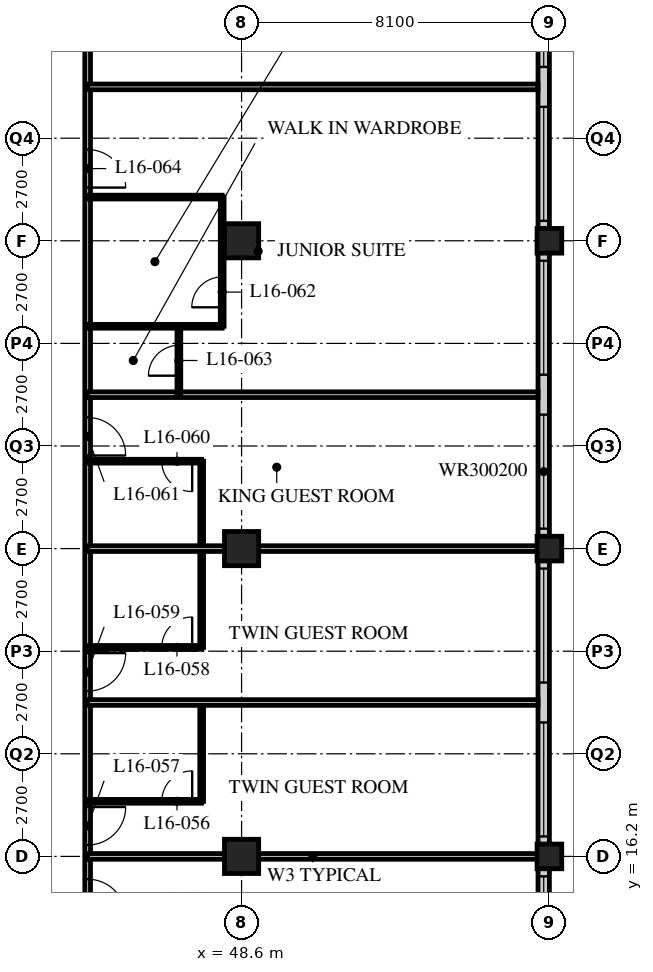
"""IFC4 building model, lengths in metres.
Left out: names, types, materials, properties, quantities, classifications, styles, units other than length and angle.
Written with IfcOpenShell. Run it as: python <this file> out.ifc"""

import sys

from ifc_helpers import new_model, si_unit, direction, frame, frame_2d, origin, origin_2d, place, context, subcontext, project, spatial, rectangle, hollow_rectangle, extrude, element, fill, save


model = new_model("IFC4")
c1 = context("Model", 3, precision=1e-05, world=origin(), true_north=direction((0.0, 1.0)))
c2 = subcontext(c1, "Body", "Model", "MODEL_VIEW")
j1 = project(units=[si_unit("LENGTHUNIT", "METRE"), si_unit("PLANEANGLEUNIT", "RADIAN")], contexts=[c1])
p1 = place(None, origin())
s1 = spatial("IfcSite", under=j1, at=p1, CompositionType="ELEMENT")
p2 = place(p1, origin())
s2 = spatial("IfcBuilding", under=s1, at=p2, CompositionType="ELEMENT")
p3 = place(p2, frame((0.0, 0.0, 67.0)))
s3 = spatial("IfcBuildingStorey", under=s2, at=p3, CompositionType="ELEMENT", Elevation=67.0)
for number, where, z_axis, x_axis in (
    (1, (48.6, 16.2, 0.0), (0.0, 0.0, 1.0), (1.0, 0.0, 0.0)),
    (2, (48.6, 24.3, 0.0), (0.0, 0.0, 1.0), (1.0, 0.0, 0.0)),
    (3, (48.6, 32.4, 0.0), (0.0, 0.0, 1.0), (1.0, 0.0, 0.0)),
):
    element("IfcColumn", number, at=place(p3, frame(where, z_axis=z_axis, x_axis=x_axis)), inside=s3, PredefinedType="COLUMN", context=c2, shape_type="SweptSolid", body=[
        extrude(hollow_rectangle(XDim=0.9, YDim=0.9, WallThickness=0.09, at=origin_2d()), origin(), (0.0, 0.0, 1.0), 3.4),
    ])
for number, where, z_axis, x_axis in (
    (4, (56.7, 16.2, 0.0), (0.0, 0.0, 1.0), (1.0, 0.0, 0.0)),
    (5, (56.7, 24.3, 0.0), (0.0, 0.0, 1.0), (1.0, 0.0, 0.0)),
    (6, (56.7, 32.4, 0.0), (0.0, 0.0, 1.0), (1.0, 0.0, 0.0)),
):
    element("IfcColumn", number, at=place(p3, frame(where, z_axis=z_axis, x_axis=x_axis)), inside=s3, PredefinedType="COLUMN", context=c2, shape_type="SweptSolid", body=[
        extrude(hollow_rectangle(XDim=0.65, YDim=0.65, WallThickness=0.05, at=origin_2d()), origin(), (0.0, 0.0, 1.0), 3.4),
    ])
p4 = place(p3, frame((56.55, 8.4, 0.0), z_axis=(0.0, 0.0, 1.0), x_axis=(0.0, 1.0, 0.0)))
e7 = element("IfcWall", 7, at=p4, inside=s3, PredefinedType="SOLIDWALL", context=c2, shape_type="SweptSolid", body=[
    extrude(rectangle(XDim=32.1, YDim=0.3, at=frame_2d((16.05, 0.0))), origin(), (0.0, 0.0, 1.0), 3.19),
])
p5 = place(p4, frame((0.225, 0.0, 0.9)))
e8 = element("IfcOpeningElement", 8, at=p5, cuts=e7, PredefinedType="OPENING", context=c2, shape_type="SweptSolid", body=[
    extrude(rectangle(XDim=3.0, YDim=2.0, at=frame_2d((1.5, 1.0))), frame((0.0, 0.16, 0.0), z_axis=(0.0, -1.0, 0.0), x_axis=(1.0, 0.0, 0.0)), (0.0, 0.0, 1.0), 0.32),
])
p6 = place(p4, frame((4.275, 0.0, 0.9)))
e9 = element("IfcOpeningElement", 9, at=p6, cuts=e7, PredefinedType="OPENING", context=c2, shape_type="SweptSolid", body=[
    extrude(rectangle(XDim=3.0, YDim=2.0, at=frame_2d((1.5, 1.0))), frame((0.0, 0.16, 0.0), z_axis=(0.0, -1.0, 0.0), x_axis=(1.0, 0.0, 0.0)), (0.0, 0.0, 1.0), 0.32),
])
p7 = place(p4, frame((8.325, 0.0, 0.9)))
e10 = element("IfcOpeningElement", 10, at=p7, cuts=e7, PredefinedType="OPENING", context=c2, shape_type="SweptSolid", body=[
    extrude(rectangle(XDim=3.0, YDim=2.0, at=frame_2d((1.5, 1.0))), frame((0.0, 0.16, 0.0), z_axis=(0.0, -1.0, 0.0), x_axis=(1.0, 0.0, 0.0)), (0.0, 0.0, 1.0), 0.32),
])
p8 = place(p4, frame((12.375, 0.0, 0.9)))
e11 = element("IfcOpeningElement", 11, at=p8, cuts=e7, PredefinedType="OPENING", context=c2, shape_type="SweptSolid", body=[
    extrude(rectangle(XDim=3.0, YDim=2.0, at=frame_2d((1.5, 1.0))), frame((0.0, 0.16, 0.0), z_axis=(0.0, -1.0, 0.0), x_axis=(1.0, 0.0, 0.0)), (0.0, 0.0, 1.0), 0.32),
])
p9 = place(p4, frame((16.425, 0.0, 0.9)))
e12 = element("IfcOpeningElement", 12, at=p9, cuts=e7, PredefinedType="OPENING", context=c2, shape_type="SweptSolid", body=[
    extrude(rectangle(XDim=3.0, YDim=2.0, at=frame_2d((1.5, 1.0))), frame((0.0, 0.16, 0.0), z_axis=(0.0, -1.0, 0.0), x_axis=(1.0, 0.0, 0.0)), (0.0, 0.0, 1.0), 0.32),
])
p10 = place(p4, frame((20.475, 0.0, 0.9)))
e13 = element("IfcOpeningElement", 13, at=p10, cuts=e7, PredefinedType="OPENING", context=c2, shape_type="SweptSolid", body=[
    extrude(rectangle(XDim=3.0, YDim=2.0, at=frame_2d((1.5, 1.0))), frame((0.0, 0.16, 0.0), z_axis=(0.0, -1.0, 0.0), x_axis=(1.0, 0.0, 0.0)), (0.0, 0.0, 1.0), 0.32),
])
p11 = place(p4, frame((24.525, 0.0, 0.9)))
e14 = element("IfcOpeningElement", 14, at=p11, cuts=e7, PredefinedType="OPENING", context=c2, shape_type="SweptSolid", body=[
    extrude(rectangle(XDim=3.0, YDim=2.0, at=frame_2d((1.5, 1.0))), frame((0.0, 0.16, 0.0), z_axis=(0.0, -1.0, 0.0), x_axis=(1.0, 0.0, 0.0)), (0.0, 0.0, 1.0), 0.32),
])
p12 = place(p4, frame((28.575, 0.0, 0.9)))
e15 = element("IfcOpeningElement", 15, at=p12, cuts=e7, PredefinedType="OPENING", context=c2, shape_type="SweptSolid", body=[
    extrude(rectangle(XDim=3.0, YDim=2.0, at=frame_2d((1.5, 1.0))), frame((0.0, 0.16, 0.0), z_axis=(0.0, -1.0, 0.0), x_axis=(1.0, 0.0, 0.0)), (0.0, 0.0, 1.0), 0.32),
])
p13 = place(p3, frame((44.55, 12.15, 0.0), z_axis=(0.0, 0.0, 1.0), x_axis=(0.0, 1.0, 0.0)))
e16 = element("IfcWall", 16, at=p13, inside=s3, PredefinedType="PARTITIONING", context=c2, shape_type="SweptSolid", body=[
    extrude(rectangle(XDim=30.15, YDim=0.15, at=frame_2d((15.075, 0.0))), origin(), (0.0, 0.0, 1.0), 3.19),
])
p14 = place(p13, frame((2.45, 0.0, 0.0)))
e17 = element("IfcOpeningElement", 17, at=p14, cuts=e16, PredefinedType="OPENING", context=c2, shape_type="SweptSolid", body=[
    extrude(rectangle(XDim=1.0, YDim=2.1, at=frame_2d((0.5, 1.05))), frame((0.0, 0.085, 0.0), z_axis=(0.0, -1.0, 0.0), x_axis=(1.0, 0.0, 0.0)), (0.0, 0.0, 1.0), 0.17),
])
p15 = place(p13, frame((4.35, 0.0, 0.0)))
e18 = element("IfcOpeningElement", 18, at=p15, cuts=e16, PredefinedType="OPENING", context=c2, shape_type="SweptSolid", body=[
    extrude(rectangle(XDim=1.0, YDim=2.1, at=frame_2d((0.5, 1.05))), frame((0.0, 0.085, 0.0), z_axis=(0.0, -1.0, 0.0), x_axis=(1.0, 0.0, 0.0)), (0.0, 0.0, 1.0), 0.17),
])
p16 = place(p13, frame((8.4, 0.0, 0.0)))
e19 = element("IfcOpeningElement", 19, at=p16, cuts=e16, PredefinedType="OPENING", context=c2, shape_type="SweptSolid", body=[
    extrude(rectangle(XDim=1.0, YDim=2.1, at=frame_2d((0.5, 1.05))), frame((0.0, 0.085, 0.0), z_axis=(0.0, -1.0, 0.0), x_axis=(1.0, 0.0, 0.0)), (0.0, 0.0, 1.0), 0.17),
])
p17 = place(p13, frame((14.6, 0.0, 0.0)))
e20 = element("IfcOpeningElement", 20, at=p17, cuts=e16, PredefinedType="OPENING", context=c2, shape_type="SweptSolid", body=[
    extrude(rectangle(XDim=1.0, YDim=2.1, at=frame_2d((0.5, 1.05))), frame((0.0, 0.085, 0.0), z_axis=(0.0, -1.0, 0.0), x_axis=(1.0, 0.0, 0.0)), (0.0, 0.0, 1.0), 0.17),
])
p18 = place(p13, frame((21.65, 0.0, 0.0)))
e21 = element("IfcOpeningElement", 21, at=p18, cuts=e16, PredefinedType="OPENING", context=c2, shape_type="SweptSolid", body=[
    extrude(rectangle(XDim=1.0, YDim=2.1, at=frame_2d((0.5, 1.05))), frame((0.0, 0.085, 0.0), z_axis=(0.0, -1.0, 0.0), x_axis=(1.0, 0.0, 0.0)), (0.0, 0.0, 1.0), 0.17),
])
p19 = place(p13, frame((26.7, 0.0, 0.0)))
e22 = element("IfcOpeningElement", 22, at=p19, cuts=e16, PredefinedType="OPENING", context=c2, shape_type="SweptSolid", body=[
    extrude(rectangle(XDim=1.0, YDim=2.1, at=frame_2d((0.5, 1.05))), frame((0.0, 0.085, 0.0), z_axis=(0.0, -1.0, 0.0), x_axis=(1.0, 0.0, 0.0)), (0.0, 0.0, 1.0), 0.17),
])
p20 = place(p3, frame((44.55, 16.2, 0.0), z_axis=(0.0, 0.0, 1.0), x_axis=(1.0, 0.0, 0.0)))
e23 = element("IfcWall", 23, at=p20, inside=s3, PredefinedType="PARTITIONING", context=c2, shape_type="SweptSolid", body=[
    extrude(rectangle(XDim=11.85, YDim=0.15, at=frame_2d((5.925, 0.0))), origin(), (0.0, 0.0, 1.0), 2.578),
])
p21 = place(p3, frame((47.55, 17.65, 0.0), z_axis=(0.0, 0.0, 1.0), x_axis=(0.0, 1.0, 0.0)))
e24 = element("IfcWall", 24, at=p21, inside=s3, PredefinedType="PARTITIONING", context=c2, shape_type="SweptSolid", body=[
    extrude(rectangle(XDim=2.6, YDim=0.1, at=frame_2d((1.3, 0.0))), origin(), (0.0, 0.0, 1.0), 3.19),
])
p22 = place(p3, frame((44.55, 17.65, 0.0), z_axis=(0.0, 0.0, 1.0), x_axis=(1.0, 0.0, 0.0)))
e25 = element("IfcWall", 25, at=p22, inside=s3, PredefinedType="PARTITIONING", context=c2, shape_type="SweptSolid", body=[
    extrude(rectangle(XDim=3.0, YDim=0.1, at=frame_2d((1.5, 0.0))), origin(), (0.0, 0.0, 1.0), 3.19),
])
p23 = place(p22, frame((1.95, 0.0, 0.0)))
e26 = element("IfcOpeningElement", 26, at=p23, cuts=e25, PredefinedType="OPENING", context=c2, shape_type="SweptSolid", body=[
    extrude(rectangle(XDim=0.8, YDim=2.1, at=frame_2d((0.4, 1.05))), frame((0.0, 0.06, 0.0), z_axis=(0.0, -1.0, 0.0), x_axis=(1.0, 0.0, 0.0)), (0.0, 0.0, 1.0), 0.12),
])
p24 = place(p3, frame((44.55, 20.25, 0.0), z_axis=(0.0, 0.0, 1.0), x_axis=(1.0, 0.0, 0.0)))
e27 = element("IfcWall", 27, at=p24, inside=s3, PredefinedType="PARTITIONING", context=c2, shape_type="SweptSolid", body=[
    extrude(rectangle(XDim=11.85, YDim=0.15, at=frame_2d((5.925, 0.0))), origin(), (0.0, 0.0, 1.0), 3.19),
])
p25 = place(p3, frame((47.55, 21.7, 0.0), z_axis=(0.0, 0.0, 1.0), x_axis=(0.0, 1.0, 0.0)))
e28 = element("IfcWall", 28, at=p25, inside=s3, PredefinedType="PARTITIONING", context=c2, shape_type="SweptSolid", body=[
    extrude(rectangle(XDim=4.9, YDim=0.1, at=frame_2d((2.45, 0.0))), origin(), (0.0, 0.0, 1.0), 3.19),
])
p26 = place(p3, frame((44.55, 21.7, 0.0), z_axis=(0.0, 0.0, 1.0), x_axis=(1.0, 0.0, 0.0)))
e29 = element("IfcWall", 29, at=p26, inside=s3, PredefinedType="PARTITIONING", context=c2, shape_type="SweptSolid", body=[
    extrude(rectangle(XDim=3.0, YDim=0.1, at=frame_2d((1.5, 0.0))), origin(), (0.0, 0.0, 1.0), 3.19),
])
p27 = place(p26, frame((1.95, 0.0, 0.0)))
e30 = element("IfcOpeningElement", 30, at=p27, cuts=e29, PredefinedType="OPENING", context=c2, shape_type="SweptSolid", body=[
    extrude(rectangle(XDim=0.8, YDim=2.1, at=frame_2d((0.4, 1.05))), frame((0.0, 0.06, 0.0), z_axis=(0.0, -1.0, 0.0), x_axis=(1.0, 0.0, 0.0)), (0.0, 0.0, 1.0), 0.12),
])
p28 = place(p3, frame((44.55, 24.3, 0.0), z_axis=(0.0, 0.0, 1.0), x_axis=(1.0, 0.0, 0.0)))
e31 = element("IfcWall", 31, at=p28, inside=s3, PredefinedType="PARTITIONING", context=c2, shape_type="SweptSolid", body=[
    extrude(rectangle(XDim=11.85, YDim=0.15, at=frame_2d((5.925, 0.0))), origin(), (0.0, 0.0, 1.0), 2.578),
])
p29 = place(p3, frame((44.55, 26.6, 0.0), z_axis=(0.0, 0.0, 1.0), x_axis=(1.0, 0.0, 0.0)))
e32 = element("IfcWall", 32, at=p29, inside=s3, PredefinedType="PARTITIONING", context=c2, shape_type="SweptSolid", body=[
    extrude(rectangle(XDim=3.0, YDim=0.1, at=frame_2d((1.5, 0.0))), origin(), (0.0, 0.0, 1.0), 3.19),
])
p30 = place(p29, frame((1.95, 0.0, 0.0)))
e33 = element("IfcOpeningElement", 33, at=p30, cuts=e32, PredefinedType="OPENING", context=c2, shape_type="SweptSolid", body=[
    extrude(rectangle(XDim=0.8, YDim=2.1, at=frame_2d((0.4, 1.05))), frame((0.0, 0.06, 0.0), z_axis=(0.0, -1.0, 0.0), x_axis=(1.0, 0.0, 0.0)), (0.0, 0.0, 1.0), 0.12),
])
p31 = place(p3, frame((44.55, 28.35, 0.0), z_axis=(0.0, 0.0, 1.0), x_axis=(1.0, 0.0, 0.0)))
e34 = element("IfcWall", 34, at=p31, inside=s3, PredefinedType="PARTITIONING", context=c2, shape_type="SweptSolid", body=[
    extrude(rectangle(XDim=11.85, YDim=0.15, at=frame_2d((5.925, 0.0))), origin(), (0.0, 0.0, 1.0), 3.19),
])
p32 = place(p3, frame((48.09, 30.15, 0.0), z_axis=(0.0, 0.0, 1.0), x_axis=(0.0, 1.0, 0.0)))
e35 = element("IfcWall", 35, at=p32, inside=s3, PredefinedType="PARTITIONING", context=c2, shape_type="SweptSolid", body=[
    extrude(rectangle(XDim=3.4, YDim=0.1, at=frame_2d((1.7, 0.0))), origin(), (0.0, 0.0, 1.0), 3.19),
])
p33 = place(p32, frame((0.5, 0.0, 0.0)))
e36 = element("IfcOpeningElement", 36, at=p33, cuts=e35, PredefinedType="OPENING", context=c2, shape_type="SweptSolid", body=[
    extrude(rectangle(XDim=0.8, YDim=2.1, at=frame_2d((0.4, 1.05))), frame((0.0, 0.06, 0.0), z_axis=(0.0, -1.0, 0.0), x_axis=(1.0, 0.0, 0.0)), (0.0, 0.0, 1.0), 0.12),
])
p34 = place(p3, frame((46.95, 28.35, 0.0), z_axis=(0.0, 0.0, 1.0), x_axis=(0.0, 1.0, 0.0)))
e37 = element("IfcWall", 37, at=p34, inside=s3, PredefinedType="PARTITIONING", context=c2, shape_type="SweptSolid", body=[
    extrude(rectangle(XDim=1.8, YDim=0.1, at=frame_2d((0.9, 0.0))), origin(), (0.0, 0.0, 1.0), 3.19),
])
p35 = place(p34, frame((0.5, 0.0, 0.0)))
e38 = element("IfcOpeningElement", 38, at=p35, cuts=e37, PredefinedType="OPENING", context=c2, shape_type="SweptSolid", body=[
    extrude(rectangle(XDim=0.8, YDim=2.1, at=frame_2d((0.4, 1.05))), frame((0.0, 0.06, 0.0), z_axis=(0.0, -1.0, 0.0), x_axis=(1.0, 0.0, 0.0)), (0.0, 0.0, 1.0), 0.12),
])
for number, where, z_axis, x_axis in (
    (39, (44.55, 30.15, 0.0), (0.0, 0.0, 1.0), (1.0, 0.0, 0.0)),
    (40, (44.55, 33.55, 0.0), (0.0, 0.0, 1.0), (1.0, 0.0, 0.0)),
):
    element("IfcWall", number, at=place(p3, frame(where, z_axis=z_axis, x_axis=x_axis)), inside=s3, PredefinedType="PARTITIONING", context=c2, shape_type="SweptSolid", body=[
        extrude(rectangle(XDim=3.54, YDim=0.1, at=frame_2d((1.77, 0.0))), origin(), (0.0, 0.0, 1.0), 3.19),
    ])
p36 = place(p3, frame((44.55, 36.45, 0.0), z_axis=(0.0, 0.0, 1.0), x_axis=(1.0, 0.0, 0.0)))
e41 = element("IfcWall", 41, at=p36, inside=s3, PredefinedType="PARTITIONING", context=c2, shape_type="SweptSolid", body=[
    extrude(rectangle(XDim=11.85, YDim=0.15, at=frame_2d((5.925, 0.0))), origin(), (0.0, 0.0, 1.0), 3.19),
])
p37 = place(p6, origin())
e42 = element("IfcWindow", 42, at=p37, inside=s3, PartitioningType="SINGLE_PANEL", PredefinedType="WINDOW", context=c2, shape_type="SweptSolid", body=[
    extrude(rectangle(XDim=3.0, YDim=2.0, at=frame_2d((1.5, 1.0))), frame((0.0, 0.03, 0.0), z_axis=(0.0, -1.0, 0.0), x_axis=(1.0, 0.0, 0.0)), (0.0, 0.0, 1.0), 0.06),
])
fill(e9, e42)
p38 = place(p7, origin())
e43 = element("IfcWindow", 43, at=p38, inside=s3, PartitioningType="SINGLE_PANEL", PredefinedType="WINDOW", context=c2, shape_type="SweptSolid", body=[
    extrude(rectangle(XDim=3.0, YDim=2.0, at=frame_2d((1.5, 1.0))), frame((0.0, 0.03, 0.0), z_axis=(0.0, -1.0, 0.0), x_axis=(1.0, 0.0, 0.0)), (0.0, 0.0, 1.0), 0.06),
])
fill(e10, e43)
p39 = place(p8, origin())
e44 = element("IfcWindow", 44, at=p39, inside=s3, PartitioningType="SINGLE_PANEL", PredefinedType="WINDOW", context=c2, shape_type="SweptSolid", body=[
    extrude(rectangle(XDim=3.0, YDim=2.0, at=frame_2d((1.5, 1.0))), frame((0.0, 0.03, 0.0), z_axis=(0.0, -1.0, 0.0), x_axis=(1.0, 0.0, 0.0)), (0.0, 0.0, 1.0), 0.06),
])
fill(e11, e44)
p40 = place(p9, origin())
e45 = element("IfcWindow", 45, at=p40, inside=s3, PartitioningType="SINGLE_PANEL", PredefinedType="WINDOW", context=c2, shape_type="SweptSolid", body=[
    extrude(rectangle(XDim=3.0, YDim=2.0, at=frame_2d((1.5, 1.0))), frame((0.0, 0.03, 0.0), z_axis=(0.0, -1.0, 0.0), x_axis=(1.0, 0.0, 0.0)), (0.0, 0.0, 1.0), 0.06),
])
fill(e12, e45)
p41 = place(p10, origin())
e46 = element("IfcWindow", 46, at=p41, inside=s3, PartitioningType="SINGLE_PANEL", PredefinedType="WINDOW", context=c2, shape_type="SweptSolid", body=[
    extrude(rectangle(XDim=3.0, YDim=2.0, at=frame_2d((1.5, 1.0))), frame((0.0, 0.03, 0.0), z_axis=(0.0, -1.0, 0.0), x_axis=(1.0, 0.0, 0.0)), (0.0, 0.0, 1.0), 0.06),
])
fill(e13, e46)
p42 = place(p11, origin())
e47 = element("IfcWindow", 47, at=p42, inside=s3, PartitioningType="SINGLE_PANEL", PredefinedType="WINDOW", context=c2, shape_type="SweptSolid", body=[
    extrude(rectangle(XDim=3.0, YDim=2.0, at=frame_2d((1.5, 1.0))), frame((0.0, 0.03, 0.0), z_axis=(0.0, -1.0, 0.0), x_axis=(1.0, 0.0, 0.0)), (0.0, 0.0, 1.0), 0.06),
])
fill(e14, e47)
p43 = place(p12, origin())
e48 = element("IfcWindow", 48, at=p43, inside=s3, PartitioningType="SINGLE_PANEL", PredefinedType="WINDOW", context=c2, shape_type="SweptSolid", body=[
    extrude(rectangle(XDim=3.0, YDim=2.0, at=frame_2d((1.5, 1.0))), frame((0.0, 0.03, 0.0), z_axis=(0.0, -1.0, 0.0), x_axis=(1.0, 0.0, 0.0)), (0.0, 0.0, 1.0), 0.06),
])
fill(e15, e48)
p44 = place(p14, origin())
e49 = element("IfcDoor", 49, at=p44, inside=s3, OperationType="SINGLE_SWING_RIGHT", PredefinedType="DOOR", context=c2, shape_type="SweptSolid", body=[
    extrude(rectangle(XDim=1.0, YDim=2.1, at=frame_2d((0.5, 1.05))), frame((0.0, 0.025, 0.0), z_axis=(0.0, -1.0, 0.0), x_axis=(1.0, 0.0, 0.0)), (0.0, 0.0, 1.0), 0.05),
])
fill(e17, e49)
p45 = place(p23, origin())
e50 = element("IfcDoor", 50, at=p45, inside=s3, OperationType="SINGLE_SWING_RIGHT", PredefinedType="DOOR", context=c2, shape_type="SweptSolid", body=[
    extrude(rectangle(XDim=0.8, YDim=2.1, at=frame_2d((0.4, 1.05))), frame((0.0, 0.025, 0.0), z_axis=(0.0, -1.0, 0.0), x_axis=(1.0, 0.0, 0.0)), (0.0, 0.0, 1.0), 0.05),
])
fill(e26, e50)
p46 = place(p15, origin())
e51 = element("IfcDoor", 51, at=p46, inside=s3, OperationType="SINGLE_SWING_LEFT", PredefinedType="DOOR", context=c2, shape_type="SweptSolid", body=[
    extrude(rectangle(XDim=1.0, YDim=2.1, at=frame_2d((0.5, 1.05))), frame((0.0, 0.025, 0.0), z_axis=(0.0, -1.0, 0.0), x_axis=(1.0, 0.0, 0.0)), (0.0, 0.0, 1.0), 0.05),
])
fill(e18, e51)
p47 = place(p27, origin())
e52 = element("IfcDoor", 52, at=p47, inside=s3, OperationType="SINGLE_SWING_RIGHT", PredefinedType="DOOR", context=c2, shape_type="SweptSolid", body=[
    extrude(rectangle(XDim=0.8, YDim=2.1, at=frame_2d((0.4, 1.05))), frame((0.0, 0.025, 0.0), z_axis=(0.0, -1.0, 0.0), x_axis=(1.0, 0.0, 0.0)), (0.0, 0.0, 1.0), 0.05),
])
fill(e30, e52)
p48 = place(p16, origin())
e53 = element("IfcDoor", 53, at=p48, inside=s3, OperationType="SINGLE_SWING_LEFT", PredefinedType="DOOR", context=c2, shape_type="SweptSolid", body=[
    extrude(rectangle(XDim=1.0, YDim=2.1, at=frame_2d((0.5, 1.05))), frame((0.0, 0.025, 0.0), z_axis=(0.0, -1.0, 0.0), x_axis=(1.0, 0.0, 0.0)), (0.0, 0.0, 1.0), 0.05),
])
fill(e19, e53)
p49 = place(p30, origin())
e54 = element("IfcDoor", 54, at=p49, inside=s3, OperationType="SINGLE_SWING_LEFT", PredefinedType="DOOR", context=c2, shape_type="SweptSolid", body=[
    extrude(rectangle(XDim=0.8, YDim=2.1, at=frame_2d((0.4, 1.05))), frame((0.0, 0.025, 0.0), z_axis=(0.0, -1.0, 0.0), x_axis=(1.0, 0.0, 0.0)), (0.0, 0.0, 1.0), 0.05),
])
fill(e33, e54)
p50 = place(p17, origin())
e55 = element("IfcDoor", 55, at=p50, inside=s3, OperationType="SINGLE_SWING_RIGHT", PredefinedType="DOOR", context=c2, shape_type="SweptSolid", body=[
    extrude(rectangle(XDim=1.0, YDim=2.1, at=frame_2d((0.5, 1.05))), frame((0.0, 0.025, 0.0), z_axis=(0.0, -1.0, 0.0), x_axis=(1.0, 0.0, 0.0)), (0.0, 0.0, 1.0), 0.05),
])
fill(e20, e55)
p51 = place(p33, origin())
e56 = element("IfcDoor", 56, at=p51, inside=s3, OperationType="SINGLE_SWING_LEFT", PredefinedType="DOOR", context=c2, shape_type="SweptSolid", body=[
    extrude(rectangle(XDim=0.8, YDim=2.1, at=frame_2d((0.4, 1.05))), frame((0.0, 0.025, 0.0), z_axis=(0.0, -1.0, 0.0), x_axis=(1.0, 0.0, 0.0)), (0.0, 0.0, 1.0), 0.05),
])
fill(e36, e56)
p52 = place(p35, origin())
e57 = element("IfcDoor", 57, at=p52, inside=s3, OperationType="SINGLE_SWING_LEFT", PredefinedType="DOOR", context=c2, shape_type="SweptSolid", body=[
    extrude(rectangle(XDim=0.8, YDim=2.1, at=frame_2d((0.4, 1.05))), frame((0.0, 0.025, 0.0), z_axis=(0.0, -1.0, 0.0), x_axis=(1.0, 0.0, 0.0)), (0.0, 0.0, 1.0), 0.05),
])
fill(e38, e57)
p53 = place(p18, origin())
e58 = element("IfcDoor", 58, at=p53, inside=s3, OperationType="SINGLE_SWING_RIGHT", PredefinedType="DOOR", context=c2, shape_type="SweptSolid", body=[
    extrude(rectangle(XDim=1.0, YDim=2.1, at=frame_2d((0.5, 1.05))), frame((0.0, 0.025, 0.0), z_axis=(0.0, -1.0, 0.0), x_axis=(1.0, 0.0, 0.0)), (0.0, 0.0, 1.0), 0.05),
])
fill(e21, e58)
save(model, sys.argv[1])
